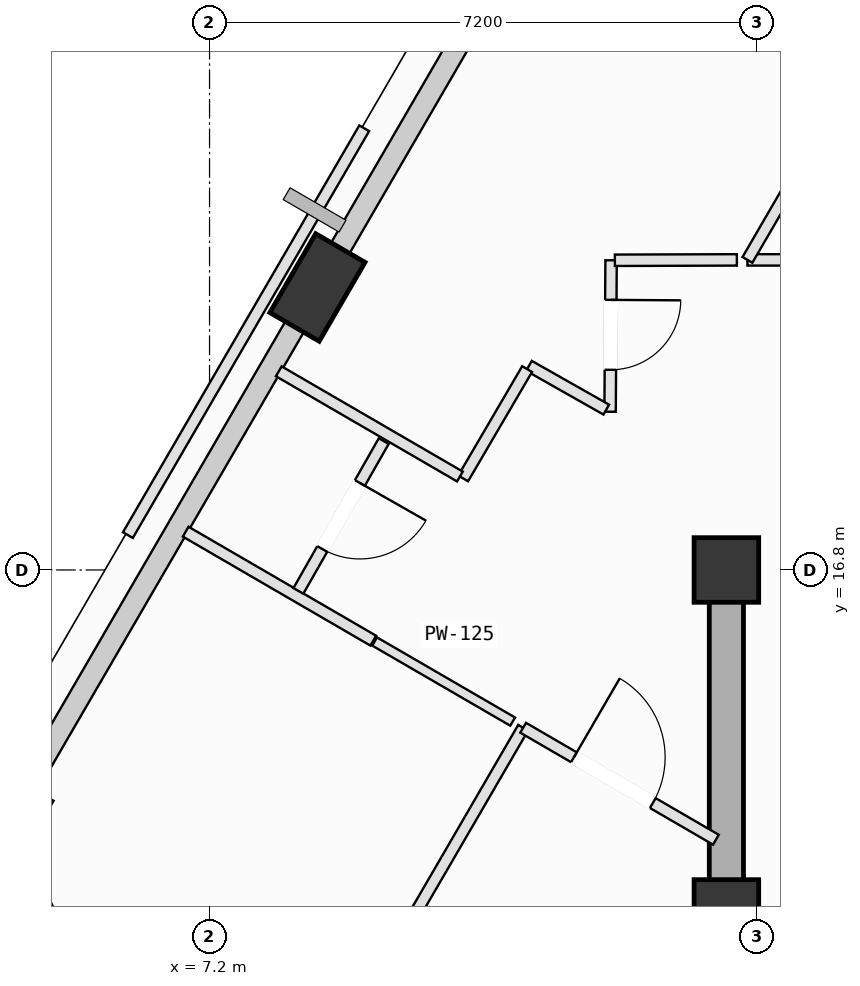
"""IFC4 building model, lengths in metres.
Left out: names, types, materials, properties, quantities, classifications, styles, units other than length and angle.
Written with IfcOpenShell. Run it as: python <this file> out.ifc"""

import sys

from ifc_helpers import new_model, si_unit, direction, frame, frame_2d, origin, origin_2d, place, context, subcontext, project, spatial, rectangle, extrude, element, fill, save


model = new_model("IFC4")
c1 = context("Model", 3, precision=1e-05, world=origin(), true_north=direction((0.0, 1.0)))
c2 = subcontext(c1, "Body", "Model", "MODEL_VIEW")
j1 = project(units=[si_unit("LENGTHUNIT", "METRE"), si_unit("PLANEANGLEUNIT", "RADIAN")], contexts=[c1])
p1 = place(None, origin())
s1 = spatial("IfcSite", under=j1, at=p1, CompositionType="ELEMENT")
p2 = place(p1, origin())
s2 = spatial("IfcBuilding", under=s1, at=p2, CompositionType="ELEMENT")
p3 = place(p2, frame((0.0, 0.0, 280.6)))
s3 = spatial("IfcBuildingStorey", under=s2, at=p3, CompositionType="ELEMENT", Elevation=280.6)
for number, where, z_axis, x_axis in (
    (1, (14.0, 12.3, 0.0), (0.0, 0.0, 1.0), (1.0, 0.0, 0.0)),
    (2, (14.0, 16.8, 0.0), (0.0, 0.0, 1.0), (1.0, 0.0, 0.0)),
):
    element("IfcColumn", number, at=place(p3, frame(where, z_axis=z_axis, x_axis=x_axis)), inside=s3, PredefinedType="COLUMN", context=c2, shape_type="SweptSolid", body=[
        extrude(rectangle(XDim=0.85, YDim=0.85, at=origin_2d()), origin(), (0.0, 0.0, 1.0), 4.0),
    ])
p4 = place(p3, frame((8.62, 20.517, 0.002), z_axis=(0.018469996615, -0.102860869307, 0.994524258523), x_axis=(0.342369599911, 0.935209458744, 0.090367722847)))
e3 = element("IfcColumn", 3, at=p4, inside=s3, PredefinedType="COLUMN", context=c2, shape_type="SweptSolid", body=[
    extrude(rectangle(XDim=1.2, YDim=0.75, at=origin_2d()), origin(), (0.0, 0.0, 1.0), 4.018),
])
p5 = place(p3, frame((4.501, 13.427, 0.002), z_axis=(0.047741083689, -0.11923153896, 0.991718018917), x_axis=(0.147510708326, 0.982805432518, 0.111058870611)))
e4 = element("IfcColumn", 4, at=p5, inside=s3, PredefinedType="COLUMN", context=c2, shape_type="SweptSolid", body=[
    extrude(rectangle(XDim=1.2, YDim=0.75, at=origin_2d()), origin(), (0.0, 0.0, 1.0), 4.03),
])
p6 = place(p3, frame((8.727, 20.702, 0.0), z_axis=(0.0, 0.0, 1.0), x_axis=(0.502244841537, 0.86472545883, 0.0)))
e5 = element("IfcWall", 5, at=p6, inside=s3, PredefinedType="SOLIDWALL", context=c2, shape_type="SweptSolid", body=[
    extrude(rectangle(XDim=7.434, YDim=0.28, at=frame_2d((3.717, 0.0))), origin(), (0.0, 0.0, 1.0), 3.265),
])
p7 = place(p3, frame((4.592, 13.584, 0.0), z_axis=(0.0, 0.0, 1.0), x_axis=(0.502274010262, 0.864708516562, 0.0)))
e6 = element("IfcWall", 6, at=p7, inside=s3, PredefinedType="SOLIDWALL", context=c2, shape_type="SweptSolid", body=[
    extrude(rectangle(XDim=7.485, YDim=0.28, at=frame_2d((3.742, 0.0))), origin(), (0.0, 0.0, 1.0), 3.265),
])
p8 = place(p3, frame((6.612, 8.823, 0.0), z_axis=(0.0, 0.0, 1.0), x_axis=(-0.41676340923, 0.909014994776, 0.0)))
e7 = element("IfcWall", 7, at=p8, inside=s3, PredefinedType="SOLIDWALL", context=c2, shape_type="SweptSolid", body=[
    extrude(rectangle(XDim=4.408, YDim=0.28, at=frame_2d((2.204, 0.0))), origin(), (0.0, 0.0, 1.0), 3.265),
])
p9 = place(p3, frame((14.0, 16.8, 0.0), z_axis=(0.0, 0.0, 1.0), x_axis=(0.0, -1.0, 0.0)))
e8 = element("IfcWall", 8, at=p9, inside=s3, PredefinedType="SHEAR", context=c2, shape_type="SweptSolid", body=[
    extrude(rectangle(XDim=9.0, YDim=0.45, at=frame_2d((4.5, 0.0))), origin(), (0.0, 0.0, 1.0), 3.78),
])
p10 = place(p3, frame((7.591, 8.295, 0.0), z_axis=(0.0, 0.0, 1.0), x_axis=(0.502314529321, 0.864684979419, 0.0)))
e9 = element("IfcWall", 9, at=p10, inside=s3, PredefinedType="PARTITIONING", context=c2, shape_type="SweptSolid", body=[
    extrude(rectangle(XDim=7.435, YDim=0.15, at=frame_2d((3.718, 0.0))), origin(), (0.0, 0.0, 1.0), 3.78),
])
p11 = place(p3, frame((11.326, 14.724, 0.0), z_axis=(0.0, 0.0, 1.0), x_axis=(0.864707313678, -0.502276081126, 0.0)))
e10 = element("IfcWall", 10, at=p11, inside=s3, PredefinedType="PARTITIONING", context=c2, shape_type="SweptSolid", body=[
    extrude(rectangle(XDim=2.933, YDim=0.15, at=frame_2d((1.466, 0.0))), origin(), (0.0, 0.0, 1.0), 3.78),
])
p12 = place(p11, frame((0.773, 0.0, 0.0)))
e11 = element("IfcOpeningElement", 11, at=p12, cuts=e10, PredefinedType="OPENING", context=c2, shape_type="SweptSolid", body=[
    extrude(rectangle(XDim=1.2, YDim=2.15, at=frame_2d((0.6, 1.075))), frame((0.0, 0.085, 0.0), z_axis=(0.0, -1.0, 0.0), x_axis=(1.0, 0.0, 0.0)), (0.0, 0.0, 1.0), 0.17),
])
p13 = place(p3, frame((6.886, 17.304, 0.0), z_axis=(0.0, 0.0, 1.0), x_axis=(0.864667908534, -0.502343914019, 0.0)))
e12 = element("IfcWall", 12, at=p13, inside=s3, PredefinedType="PARTITIONING", context=c2, shape_type="SweptSolid", body=[
    extrude(rectangle(XDim=2.854, YDim=0.15, at=frame_2d((1.427, 0.0))), origin(), (0.0, 0.0, 1.0), 3.78),
])
p14 = place(p3, frame((9.372, 15.859, 0.0), z_axis=(0.0, 0.0, 1.0), x_axis=(0.864881773896, -0.501975614131, 0.0)))
e13 = element("IfcWall", 13, at=p14, inside=s3, PredefinedType="PARTITIONING", context=c2, shape_type="SweptSolid", body=[
    extrude(rectangle(XDim=2.1, YDim=0.125, at=frame_2d((1.05, 0.0))), origin(), (0.0, 0.0, 1.0), 3.78),
])
p15 = place(p3, frame((20.21, 20.88, 0.0), z_axis=(0.0, 0.0, 1.0), x_axis=(-1.0, 0.0, 0.0)))
e14 = element("IfcWall", 14, at=p15, inside=s3, PredefinedType="PARTITIONING", context=c2, shape_type="SweptSolid", body=[
    extrude(rectangle(XDim=5.933, YDim=0.15, at=frame_2d((2.966, 0.0))), origin(), (0.0, 0.0, 1.0), 3.415),
])
p16 = place(p15, frame((2.507, 0.0, 0.0)))
e15 = element("IfcOpeningElement", 15, at=p16, cuts=e14, PredefinedType="OPENING", context=c2, shape_type="SweptSolid", body=[
    extrude(rectangle(XDim=0.92, YDim=2.1, at=frame_2d((0.46, 1.05))), frame((0.0, 0.085, 0.0), z_axis=(0.0, -1.0, 0.0), x_axis=(1.0, 0.0, 0.0)), (0.0, 0.0, 1.0), 0.17),
])
p17 = place(p3, frame((14.277, 20.88, 0.0), z_axis=(0.0, 0.0, 1.0), x_axis=(0.502251695272, 0.864721478047, 0.0)))
e16 = element("IfcWall", 16, at=p17, inside=s3, PredefinedType="PARTITIONING", context=c2, shape_type="SweptSolid", body=[
    extrude(rectangle(XDim=6.134, YDim=0.15, at=frame_2d((3.067, 0.0))), origin(), (0.0, 0.0, 1.0), 3.78),
])
p18 = place(p3, frame((12.483, 20.875, 0.0), z_axis=(0.0, 0.0, 1.0), x_axis=(-0.006492574166, -0.999978923018, 0.0)))
e17 = element("IfcWall", 17, at=p18, inside=s3, PredefinedType="PARTITIONING", context=c2, shape_type="SweptSolid", body=[
    extrude(rectangle(XDim=1.993, YDim=0.15, at=frame_2d((0.997, 0.0))), origin(), (0.0, 0.0, 1.0), 3.78),
])
p19 = place(p18, frame((0.521, 0.0, 0.0)))
e18 = element("IfcOpeningElement", 18, at=p19, cuts=e17, PredefinedType="OPENING", context=c2, shape_type="SweptSolid", body=[
    extrude(rectangle(XDim=0.92, YDim=2.1, at=frame_2d((0.46, 1.05))), frame((0.0, 0.085, 0.0), z_axis=(0.0, -1.0, 0.0), x_axis=(1.0, 0.0, 0.0)), (0.0, 0.0, 1.0), 0.17),
])
p20 = place(p3, frame((12.42, 18.91, 0.0), z_axis=(0.0, 0.0, 1.0), x_axis=(-0.870037118889, 0.492986218626, 0.0)))
e19 = element("IfcWall", 19, at=p20, inside=s3, PredefinedType="PARTITIONING", context=c2, shape_type="SweptSolid", body=[
    extrude(rectangle(XDim=1.169, YDim=0.15, at=frame_2d((0.584, 0.0))), origin(), (0.0, 0.0, 1.0), 3.78),
])
p21 = place(p3, frame((11.378, 19.443, 0.0), z_axis=(0.0, 0.0, 1.0), x_axis=(-0.504699947851, -0.863294829498, 0.0)))
e20 = element("IfcWall", 20, at=p21, inside=s3, PredefinedType="PARTITIONING", context=c2, shape_type="SweptSolid", body=[
    extrude(rectangle(XDim=1.666, YDim=0.15, at=frame_2d((0.833, 0.0))), origin(), (0.0, 0.0, 1.0), 3.78),
])
p22 = place(p3, frame((10.494, 18.03, 0.0), z_axis=(0.0, 0.0, 1.0), x_axis=(-0.864715714853, 0.502261617572, 0.0)))
e21 = element("IfcWall", 21, at=p22, inside=s3, PredefinedType="PARTITIONING", context=c2, shape_type="SweptSolid", body=[
    extrude(rectangle(XDim=2.756, YDim=0.15, at=frame_2d((1.378, 0.0))), origin(), (0.0, 0.0, 1.0), 3.78),
])
p23 = place(p3, frame((8.187, 20.152, 0.0), z_axis=(0.0, 0.0, 1.0), x_axis=(0.502040893347, 0.864843882679, 0.0)))
e22 = element("IfcWall", 22, at=p23, inside=s3, PredefinedType="PARTITIONING", context=c2, shape_type="SweptSolid", body=[
    extrude(rectangle(XDim=0.747, YDim=0.15, at=frame_2d((0.374, 0.0))), origin(), (0.0, 0.0, 1.0), 3.78),
])
p24 = place(p3, frame((14.138, 20.88, 0.0), z_axis=(0.0, 0.0, 1.0), x_axis=(-0.999995372275, -0.003042273722, 0.0)))
e23 = element("IfcWall", 23, at=p24, inside=s3, PredefinedType="PARTITIONING", context=c2, shape_type="SweptSolid", body=[
    extrude(rectangle(XDim=1.605, YDim=0.15, at=frame_2d((0.802, 0.0))), origin(), (0.0, 0.0, 1.0), 3.78),
])
p25 = place(p3, frame((9.492, 18.496, 0.0), z_axis=(0.0, 0.0, 1.0), x_axis=(-0.495025964314, -0.868878181712, 0.0)))
e24 = element("IfcWall", 24, at=p25, inside=s3, PredefinedType="PARTITIONING", context=c2, shape_type="SweptSolid", body=[
    extrude(rectangle(XDim=2.269, YDim=0.15, at=frame_2d((1.134, 0.0))), origin(), (0.0, 0.0, 1.0), 3.78),
])
p26 = place(p25, frame((0.634, 0.0, 0.0)))
e25 = element("IfcOpeningElement", 25, at=p26, cuts=e24, PredefinedType="OPENING", context=c2, shape_type="SweptSolid", body=[
    extrude(rectangle(XDim=1.0, YDim=2.12, at=frame_2d((0.5, 1.06))), frame((0.0, 0.085, 0.0), z_axis=(0.0, -1.0, 0.0), x_axis=(1.0, 0.0, 0.0)), (0.0, 0.0, 1.0), 0.17),
])
p27 = place(p3, frame((6.126, 17.259, 0.0), z_axis=(0.0, 0.0, 1.0), x_axis=(0.502246830531, 0.864724303591, 0.0)))
e26 = element("IfcWall", 26, at=p27, inside=s3, PredefinedType="PARTITIONING", context=c2, shape_type="SweptSolid", body=[
    extrude(rectangle(XDim=6.19, YDim=0.15, at=frame_2d((3.095, 0.0))), origin(), (0.0, 0.0, 1.0), 3.78),
])
p28 = place(p12, origin())
e27 = element("IfcDoor", 27, at=p28, inside=s3, OperationType="SINGLE_SWING_LEFT", PredefinedType="DOOR", context=c2, shape_type="SweptSolid", body=[
    extrude(rectangle(XDim=1.2, YDim=2.15, at=frame_2d((0.6, 1.075))), frame((0.0, 0.025, 0.0), z_axis=(0.0, -1.0, 0.0), x_axis=(1.0, 0.0, 0.0)), (0.0, 0.0, 1.0), 0.05),
])
fill(e11, e27)
p29 = place(p19, origin())
e28 = element("IfcDoor", 28, at=p29, inside=s3, OperationType="SINGLE_SWING_LEFT", PredefinedType="DOOR", context=c2, shape_type="SweptSolid", body=[
    extrude(rectangle(XDim=0.92, YDim=2.1, at=frame_2d((0.46, 1.05))), frame((0.0, 0.025, 0.0), z_axis=(0.0, -1.0, 0.0), x_axis=(1.0, 0.0, 0.0)), (0.0, 0.0, 1.0), 0.05),
])
fill(e18, e28)
p30 = place(p26, origin())
e29 = element("IfcDoor", 29, at=p30, inside=s3, OperationType="SINGLE_SWING_LEFT", PredefinedType="DOOR", context=c2, shape_type="SweptSolid", body=[
    extrude(rectangle(XDim=1.0, YDim=2.12, at=frame_2d((0.5, 1.06))), frame((0.0, 0.025, 0.0), z_axis=(0.0, -1.0, 0.0), x_axis=(1.0, 0.0, 0.0)), (0.0, 0.0, 1.0), 0.05),
])
fill(e25, e29)
save(model, sys.argv[1])
